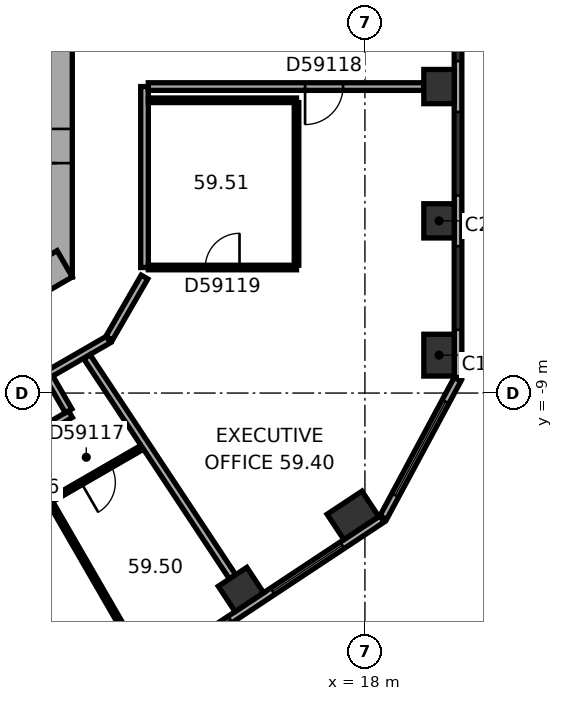
"""IFC4 building model, lengths in metres.
Left out: names, types, materials, properties, quantities, classifications, styles, units other than length and angle.
Written with IfcOpenShell. Run it as: python <this file> out.ifc"""

import sys

from ifc_helpers import new_model, si_unit, direction, frame, frame_2d, origin, origin_2d, place, context, subcontext, project, spatial, rectangle, extrude, element, fill, save


model = new_model("IFC4")
c1 = context("Model", 3, precision=1e-05, world=origin(), true_north=direction((0.0, 1.0)))
c2 = subcontext(c1, "Body", "Model", "MODEL_VIEW")
j1 = project(units=[si_unit("LENGTHUNIT", "METRE"), si_unit("PLANEANGLEUNIT", "RADIAN")], contexts=[c1])
p1 = place(None, origin())
s1 = spatial("IfcSite", under=j1, at=p1, CompositionType="ELEMENT")
p2 = place(p1, origin())
s2 = spatial("IfcBuilding", under=s1, at=p2, CompositionType="ELEMENT")
p3 = place(p2, frame((0.0, 0.0, 240.2)))
s3 = spatial("IfcBuildingStorey", under=s2, at=p3, CompositionType="ELEMENT", Elevation=240.2)
p4 = place(p3, frame((19.95, -8.003, 0.0), z_axis=(0.0, 0.0, 1.0), x_axis=(0.0, 1.0, 0.0)))
e1 = element("IfcColumn", 1, at=p4, inside=s3, PredefinedType="COLUMN", context=c2, shape_type="SweptSolid", body=[
    extrude(rectangle(XDim=1.1, YDim=0.8, at=origin_2d()), origin(), (0.0, 0.0, 1.0), 3.7),
])
for number, where, z_axis, x_axis in (
    (2, (19.95, -4.469, 0.0), (0.0, 0.0, 1.0), (0.0, 1.0, 0.0)),
    (3, (19.95, -0.936, 0.0), (0.0, 0.0, 1.0), (0.0, 1.0, 0.0)),
    (4, (14.738, -14.169, 0.0), (0.0, 0.0, 1.0), (0.834, 0.552, 0.0)),
):
    element("IfcColumn", number, at=place(p3, frame(where, z_axis=z_axis, x_axis=x_axis)), inside=s3, PredefinedType="COLUMN", context=c2, shape_type="SweptSolid", body=[
        extrude(rectangle(XDim=0.9, YDim=0.8, at=origin_2d()), origin(), (0.0, 0.0, 1.0), 3.7),
    ])
p5 = place(p3, frame((17.685, -12.219, 0.0), z_axis=(0.0, 0.0, 1.0), x_axis=(0.833885822067, 0.551936985312, 0.0)))
e5 = element("IfcColumn", 5, at=p5, inside=s3, PredefinedType="COLUMN", context=c2, shape_type="SweptSolid", body=[
    extrude(rectangle(XDim=1.1, YDim=0.8, at=origin_2d()), origin(), (0.0, 0.0, 1.0), 3.7),
])
p6 = place(p3, frame((9.9, -5.947, 0.0), z_axis=(0.0, 0.0, 1.0), x_axis=(0.0, 1.0, 0.0)))
e6 = element("IfcWall", 6, at=p6, inside=s3, PredefinedType="SHEAR", context=c2, shape_type="SweptSolid", body=[
    extrude(rectangle(XDim=11.894, YDim=0.8, at=frame_2d((5.947, 0.0))), origin(), (0.0, 0.0, 1.0), 3.7),
])
p7 = place(p6, frame((6.147, 0.0, 0.0)))
e7 = element("IfcOpeningElement", 7, at=p7, cuts=e6, PredefinedType="OPENING", context=c2, shape_type="SweptSolid", body=[
    extrude(rectangle(XDim=1.5, YDim=2.1, at=frame_2d((0.75, 1.05))), frame((0.0, 0.41, 0.0), z_axis=(0.0, -1.0, 0.0), x_axis=(1.0, 0.0, 0.0)), (0.0, 0.0, 1.0), 0.82),
])
p8 = place(p6, frame((2.997, 0.0, 0.0)))
e8 = element("IfcOpeningElement", 8, at=p8, cuts=e6, PredefinedType="OPENING", context=c2, shape_type="SweptSolid", body=[
    extrude(rectangle(XDim=0.9, YDim=2.1, at=frame_2d((0.45, 1.05))), frame((0.0, 0.41, 0.0), z_axis=(0.0, -1.0, 0.0), x_axis=(1.0, 0.0, 0.0)), (0.0, 0.0, 1.0), 0.82),
])
p9 = place(p3, frame((-0.2, -11.547, 0.0), z_axis=(0.0, 0.0, 1.0), x_axis=(0.866023897231, 0.500002609418, 0.0)))
e9 = element("IfcWall", 9, at=p9, inside=s3, PredefinedType="SHEAR", context=c2, shape_type="SweptSolid", body=[
    extrude(rectangle(XDim=11.894, YDim=0.8, at=frame_2d((5.947, 0.0))), origin(), (0.0, 0.0, 1.0), 3.7),
])
p10 = place(p9, frame((2.497, 0.0, 0.0)))
e10 = element("IfcOpeningElement", 10, at=p10, cuts=e9, PredefinedType="OPENING", context=c2, shape_type="SweptSolid", body=[
    extrude(rectangle(XDim=1.1, YDim=2.1, at=frame_2d((0.55, 1.05))), frame((0.0, 0.41, 0.0), z_axis=(0.0, -1.0, 0.0), x_axis=(1.0, 0.0, 0.0)), (0.0, 0.0, 1.0), 0.82),
])
p11 = place(p9, frame((5.097, 0.0, 0.0)))
e11 = element("IfcOpeningElement", 11, at=p11, cuts=e9, PredefinedType="OPENING", context=c2, shape_type="SweptSolid", body=[
    extrude(rectangle(XDim=1.1, YDim=2.1, at=frame_2d((0.55, 1.05))), frame((0.0, 0.41, 0.0), z_axis=(0.0, -1.0, 0.0), x_axis=(1.0, 0.0, 0.0)), (0.0, 0.0, 1.0), 0.82),
])
p12 = place(p9, frame((7.697, 0.0, 0.0)))
e12 = element("IfcOpeningElement", 12, at=p12, cuts=e9, PredefinedType="OPENING", context=c2, shape_type="SweptSolid", body=[
    extrude(rectangle(XDim=1.1, YDim=2.1, at=frame_2d((0.55, 1.05))), frame((0.0, 0.41, 0.0), z_axis=(0.0, -1.0, 0.0), x_axis=(1.0, 0.0, 0.0)), (0.0, 0.0, 1.0), 0.82),
])
p13 = place(p3, frame((20.45, -8.59, 0.0), z_axis=(0.0, 0.0, 1.0), x_axis=(0.0, 1.0, 0.0)))
e13 = element("IfcWall", 13, at=p13, inside=s3, PredefinedType="STANDARD", context=c2, shape_type="SweptSolid", body=[
    extrude(rectangle(XDim=18.841, YDim=0.2, at=frame_2d((9.421, 0.0))), origin(), (0.0, 0.0, 1.0), 3.7),
])
p14 = place(p13, frame((1.254, 0.0, 0.9)))
e14 = element("IfcOpeningElement", 14, at=p14, cuts=e13, PredefinedType="OPENING", context=c2, shape_type="SweptSolid", body=[
    extrude(rectangle(XDim=2.2, YDim=2.0, at=frame_2d((1.1, 1.0))), frame((0.0, 0.11, 0.0), z_axis=(0.0, -1.0, 0.0), x_axis=(1.0, 0.0, 0.0)), (0.0, 0.0, 1.0), 0.22),
])
p15 = place(p13, frame((4.788, 0.0, 0.9)))
e15 = element("IfcOpeningElement", 15, at=p15, cuts=e13, PredefinedType="OPENING", context=c2, shape_type="SweptSolid", body=[
    extrude(rectangle(XDim=2.2, YDim=2.0, at=frame_2d((1.1, 1.0))), frame((0.0, 0.11, 0.0), z_axis=(0.0, -1.0, 0.0), x_axis=(1.0, 0.0, 0.0)), (0.0, 0.0, 1.0), 0.22),
])
p16 = place(p13, frame((8.322, 0.0, 0.9)))
e16 = element("IfcOpeningElement", 16, at=p16, cuts=e13, PredefinedType="OPENING", context=c2, shape_type="SweptSolid", body=[
    extrude(rectangle(XDim=2.2, YDim=2.0, at=frame_2d((1.1, 1.0))), frame((0.0, 0.11, 0.0), z_axis=(0.0, -1.0, 0.0), x_axis=(1.0, 0.0, 0.0)), (0.0, 0.0, 1.0), 0.22),
])
p17 = place(p13, frame((11.855, 0.0, 0.9)))
e17 = element("IfcOpeningElement", 17, at=p17, cuts=e13, PredefinedType="OPENING", context=c2, shape_type="SweptSolid", body=[
    extrude(rectangle(XDim=2.2, YDim=2.0, at=frame_2d((1.1, 1.0))), frame((0.0, 0.11, 0.0), z_axis=(0.0, -1.0, 0.0), x_axis=(1.0, 0.0, 0.0)), (0.0, 0.0, 1.0), 0.22),
])
p18 = place(p13, frame((15.389, 0.0, 0.9)))
e18 = element("IfcOpeningElement", 18, at=p18, cuts=e13, PredefinedType="OPENING", context=c2, shape_type="SweptSolid", body=[
    extrude(rectangle(XDim=2.2, YDim=2.0, at=frame_2d((1.1, 1.0))), frame((0.0, 0.11, 0.0), z_axis=(0.0, -1.0, 0.0), x_axis=(1.0, 0.0, 0.0)), (0.0, 0.0, 1.0), 0.22),
])
p19 = place(p3, frame((2.739, -22.711, 0.0), z_axis=(0.0, 0.0, 1.0), x_axis=(0.833885723098, 0.551937134838, 0.0)))
e19 = element("IfcWall", 19, at=p19, inside=s3, PredefinedType="STANDARD", context=c2, shape_type="SweptSolid", body=[
    extrude(rectangle(XDim=18.841, YDim=0.2, at=frame_2d((9.421, 0.0))), origin(), (0.0, 0.0, 1.0), 3.7),
])
p20 = place(p19, frame((1.252, 0.0, 0.9)))
e20 = element("IfcOpeningElement", 20, at=p20, cuts=e19, PredefinedType="OPENING", context=c2, shape_type="SweptSolid", body=[
    extrude(rectangle(XDim=2.2, YDim=2.0, at=frame_2d((1.1, 1.0))), frame((0.0, 0.11, 0.0), z_axis=(0.0, -1.0, 0.0), x_axis=(1.0, 0.0, 0.0)), (0.0, 0.0, 1.0), 0.22),
])
p21 = place(p19, frame((4.786, 0.0, 0.9)))
e21 = element("IfcOpeningElement", 21, at=p21, cuts=e19, PredefinedType="OPENING", context=c2, shape_type="SweptSolid", body=[
    extrude(rectangle(XDim=2.2, YDim=2.0, at=frame_2d((1.1, 1.0))), frame((0.0, 0.11, 0.0), z_axis=(0.0, -1.0, 0.0), x_axis=(1.0, 0.0, 0.0)), (0.0, 0.0, 1.0), 0.22),
])
p22 = place(p19, frame((8.32, 0.0, 0.9)))
e22 = element("IfcOpeningElement", 22, at=p22, cuts=e19, PredefinedType="OPENING", context=c2, shape_type="SweptSolid", body=[
    extrude(rectangle(XDim=2.2, YDim=2.0, at=frame_2d((1.1, 1.0))), frame((0.0, 0.11, 0.0), z_axis=(0.0, -1.0, 0.0), x_axis=(1.0, 0.0, 0.0)), (0.0, 0.0, 1.0), 0.22),
])
p23 = place(p19, frame((11.854, 0.0, 0.9)))
e23 = element("IfcOpeningElement", 23, at=p23, cuts=e19, PredefinedType="OPENING", context=c2, shape_type="SweptSolid", body=[
    extrude(rectangle(XDim=2.2, YDim=2.0, at=frame_2d((1.1, 1.0))), frame((0.0, 0.11, 0.0), z_axis=(0.0, -1.0, 0.0), x_axis=(1.0, 0.0, 0.0)), (0.0, 0.0, 1.0), 0.22),
])
p24 = place(p19, frame((15.387, 0.0, 0.9)))
e24 = element("IfcOpeningElement", 24, at=p24, cuts=e19, PredefinedType="OPENING", context=c2, shape_type="SweptSolid", body=[
    extrude(rectangle(XDim=2.2, YDim=2.0, at=frame_2d((1.1, 1.0))), frame((0.0, 0.11, 0.0), z_axis=(0.0, -1.0, 0.0), x_axis=(1.0, 0.0, 0.0)), (0.0, 0.0, 1.0), 0.22),
])
p25 = place(p3, frame((18.483, -12.276, 0.0), z_axis=(0.0, 0.0, 1.0), x_axis=(0.473267675015, 0.880918672629, 0.0)))
e25 = element("IfcWall", 25, at=p25, inside=s3, PredefinedType="STANDARD", context=c2, shape_type="SweptSolid", body=[
    extrude(rectangle(XDim=4.13, YDim=0.2, at=frame_2d((2.065, 0.0))), origin(), (0.0, 0.0, 1.0), 3.7),
])
p26 = place(p25, frame((0.665, 0.0, 0.9)))
e26 = element("IfcOpeningElement", 26, at=p26, cuts=e25, PredefinedType="OPENING", context=c2, shape_type="SweptSolid", body=[
    extrude(rectangle(XDim=2.8, YDim=2.0, at=frame_2d((1.4, 1.0))), frame((0.0, 0.11, 0.0), z_axis=(0.0, -1.0, 0.0), x_axis=(1.0, 0.0, 0.0)), (0.0, 0.0, 1.0), 0.22),
])
p27 = place(p3, frame((2.716, -13.906, 0.0), z_axis=(0.0, 0.0, 1.0), x_axis=(0.866040290674, 0.499974214264, 0.0)))
e27 = element("IfcWall", 27, at=p27, inside=s3, PredefinedType="PARTITIONING", context=c2, shape_type="SweptSolid", body=[
    extrude(rectangle(XDim=8.702, YDim=0.2, at=frame_2d((4.351, 0.0))), origin(), (0.0, 0.0, 1.0), 3.42),
])
p28 = place(p27, frame((5.26, 0.0, 0.0)))
e28 = element("IfcOpeningElement", 28, at=p28, cuts=e27, PredefinedType="OPENING", context=c2, shape_type="SweptSolid", body=[
    extrude(rectangle(XDim=1.0, YDim=2.1, at=frame_2d((0.5, 1.05))), frame((0.0, 0.11, 0.0), z_axis=(0.0, -1.0, 0.0), x_axis=(1.0, 0.0, 0.0)), (0.0, 0.0, 1.0), 0.22),
])
p29 = place(p3, frame((6.183, -13.867, 0.0), z_axis=(0.0, 0.0, 1.0), x_axis=(0.866031365477, 0.499989673903, 0.0)))
e29 = element("IfcWall", 29, at=p29, inside=s3, PredefinedType="PARTITIONING", context=c2, shape_type="SweptSolid", body=[
    extrude(rectangle(XDim=6.881, YDim=0.12, at=frame_2d((3.44, 0.0))), origin(), (0.0, 0.0, 1.0), 3.42),
])
p30 = place(p29, frame((0.5, 0.0, 0.0)))
e30 = element("IfcOpeningElement", 30, at=p30, cuts=e29, PredefinedType="OPENING", context=c2, shape_type="SweptSolid", body=[
    extrude(rectangle(XDim=1.0, YDim=2.1, at=frame_2d((0.5, 1.05))), frame((0.0, 0.07, 0.0), z_axis=(0.0, -1.0, 0.0), x_axis=(1.0, 0.0, 0.0)), (0.0, 0.0, 1.0), 0.14),
])
p31 = place(p29, frame((2.583, 0.0, 0.0)))
e31 = element("IfcOpeningElement", 31, at=p31, cuts=e29, PredefinedType="OPENING", context=c2, shape_type="SweptSolid", body=[
    extrude(rectangle(XDim=0.9, YDim=2.1, at=frame_2d((0.45, 1.05))), frame((0.0, 0.07, 0.0), z_axis=(0.0, -1.0, 0.0), x_axis=(1.0, 0.0, 0.0)), (0.0, 0.0, 1.0), 0.14),
])
p32 = place(p29, frame((5.023, 0.0, 0.0)))
e32 = element("IfcOpeningElement", 32, at=p32, cuts=e29, PredefinedType="OPENING", context=c2, shape_type="SweptSolid", body=[
    extrude(rectangle(XDim=0.9, YDim=2.1, at=frame_2d((0.45, 1.05))), frame((0.0, 0.07, 0.0), z_axis=(0.0, -1.0, 0.0), x_axis=(1.0, 0.0, 0.0)), (0.0, 0.0, 1.0), 0.14),
])
p33 = place(p3, frame((9.652, -8.515, 0.0), z_axis=(0.0, 0.0, 1.0), x_axis=(0.866020375458, 0.500008709215, 0.0)))
e33 = element("IfcWall", 33, at=p33, inside=s3, PredefinedType="PARTITIONING", context=c2, shape_type="SweptSolid", body=[
    extrude(rectangle(XDim=1.846, YDim=0.2, at=frame_2d((0.923, 0.0))), origin(), (0.0, 0.0, 1.0), 3.42),
])
p34 = place(p3, frame((10.202, -9.469, 0.0), z_axis=(0.0, 0.0, 1.0), x_axis=(-0.499968756647, 0.866043441391, 0.0)))
e34 = element("IfcWall", 34, at=p34, inside=s3, PredefinedType="PARTITIONING", context=c2, shape_type="SweptSolid", body=[
    extrude(rectangle(XDim=1.001, YDim=0.2, at=frame_2d((0.5, 0.0))), origin(), (0.0, 0.0, 1.0), 3.42),
])
p35 = place(p3, frame((11.27, -7.558, 0.0), z_axis=(0.0, 0.0, 1.0), x_axis=(0.499964847546, 0.866045698112, 0.0)))
e35 = element("IfcWall", 35, at=p35, inside=s3, PredefinedType="PARTITIONING", context=c2, shape_type="SweptSolid", body=[
    extrude(rectangle(XDim=1.86, YDim=0.2, at=frame_2d((0.93, 0.0))), origin(), (0.0, 0.0, 1.0), 3.42),
])
p36 = place(p3, frame((11.87, -15.588, 0.0), z_axis=(0.0, 0.0, 1.0), x_axis=(-0.49999774064, 0.866026708223, 0.0)))
e36 = element("IfcWall", 36, at=p36, inside=s3, PredefinedType="PARTITIONING", context=c2, shape_type="SweptSolid", body=[
    extrude(rectangle(XDim=4.273, YDim=0.12, at=frame_2d((2.137, 0.0))), origin(), (0.0, 0.0, 1.0), 3.42),
])
p37 = place(p3, frame((12.2, -5.697, 0.0), z_axis=(0.0, 0.0, 1.0), x_axis=(0.0, 1.0, 0.0)))
e37 = element("IfcWall", 37, at=p37, inside=s3, PredefinedType="PARTITIONING", context=c2, shape_type="SweptSolid", body=[
    extrude(rectangle(XDim=4.761, YDim=0.2, at=frame_2d((2.381, 0.0))), origin(), (0.0, 0.0, 1.0), 3.42),
])
p38 = place(p3, frame((12.3, -1.297, 0.0), z_axis=(0.0, 0.0, 1.0), x_axis=(1.0, 0.0, 0.0)))
e38 = element("IfcWall", 38, at=p38, inside=s3, PredefinedType="PARTITIONING", context=c2, shape_type="SweptSolid", body=[
    extrude(rectangle(XDim=3.9, YDim=0.12, at=frame_2d((1.95, 0.0))), origin(), (0.0, 0.0, 1.0), 3.42),
])
p39 = place(p3, frame((12.3, -0.936, 0.0), z_axis=(0.0, 0.0, 1.0), x_axis=(1.0, 0.0, 0.0)))
e39 = element("IfcWall", 39, at=p39, inside=s3, PredefinedType="PARTITIONING", context=c2, shape_type="SweptSolid", body=[
    extrude(rectangle(XDim=7.25, YDim=0.2, at=frame_2d((3.625, 0.0))), origin(), (0.0, 0.0, 1.0), 2.87),
])
p40 = place(p39, frame((4.125, 0.0, 0.0)))
e40 = element("IfcOpeningElement", 40, at=p40, cuts=e39, PredefinedType="OPENING", context=c2, shape_type="SweptSolid", body=[
    extrude(rectangle(XDim=1.0, YDim=2.1, at=frame_2d((0.5, 1.05))), frame((0.0, 0.11, 0.0), z_axis=(0.0, -1.0, 0.0), x_axis=(1.0, 0.0, 0.0)), (0.0, 0.0, 1.0), 0.22),
])
p41 = place(p3, frame((14.517, -13.836, 0.0), z_axis=(0.0, 0.0, 1.0), x_axis=(-0.551938455794, 0.833884848775, 0.0)))
e41 = element("IfcWall", 41, at=p41, inside=s3, PredefinedType="PARTITIONING", context=c2, shape_type="SweptSolid", body=[
    extrude(rectangle(XDim=6.944, YDim=0.2, at=frame_2d((3.472, 0.0))), origin(), (0.0, 0.0, 1.0), 2.87),
])
p42 = place(p3, frame((16.2, -5.697, 0.0), z_axis=(0.0, 0.0, 1.0), x_axis=(-1.0, 0.0, 0.0)))
e42 = element("IfcWall", 42, at=p42, inside=s3, PredefinedType="PARTITIONING", context=c2, shape_type="SweptSolid", body=[
    extrude(rectangle(XDim=3.9, YDim=0.12, at=frame_2d((1.95, 0.0))), origin(), (0.0, 0.0, 1.0), 3.42),
])
p43 = place(p42, frame((1.5, 0.0, 0.0)))
e43 = element("IfcOpeningElement", 43, at=p43, cuts=e42, PredefinedType="OPENING", context=c2, shape_type="SweptSolid", body=[
    extrude(rectangle(XDim=0.9, YDim=2.1, at=frame_2d((0.45, 1.05))), frame((0.0, 0.07, 0.0), z_axis=(0.0, -1.0, 0.0), x_axis=(1.0, 0.0, 0.0)), (0.0, 0.0, 1.0), 0.14),
])
p44 = place(p3, frame((16.2, -1.357, 0.0), z_axis=(0.0, 0.0, 1.0), x_axis=(0.0, -1.0, 0.0)))
e44 = element("IfcWall", 44, at=p44, inside=s3, PredefinedType="PARTITIONING", context=c2, shape_type="SweptSolid", body=[
    extrude(rectangle(XDim=4.28, YDim=0.12, at=frame_2d((2.14, 0.0))), origin(), (0.0, 0.0, 1.0), 3.42),
])
p45 = place(p14, origin())
e45 = element("IfcWindow", 45, at=p45, inside=s3, PartitioningType="SINGLE_PANEL", PredefinedType="WINDOW", context=c2, shape_type="SweptSolid", body=[
    extrude(rectangle(XDim=2.2, YDim=2.0, at=frame_2d((1.1, 1.0))), frame((0.0, 0.03, 0.0), z_axis=(0.0, -1.0, 0.0), x_axis=(1.0, 0.0, 0.0)), (0.0, 0.0, 1.0), 0.06),
])
fill(e14, e45)
p46 = place(p15, origin())
e46 = element("IfcWindow", 46, at=p46, inside=s3, PartitioningType="SINGLE_PANEL", PredefinedType="WINDOW", context=c2, shape_type="SweptSolid", body=[
    extrude(rectangle(XDim=2.2, YDim=2.0, at=frame_2d((1.1, 1.0))), frame((0.0, 0.03, 0.0), z_axis=(0.0, -1.0, 0.0), x_axis=(1.0, 0.0, 0.0)), (0.0, 0.0, 1.0), 0.06),
])
fill(e15, e46)
p47 = place(p16, origin())
e47 = element("IfcWindow", 47, at=p47, inside=s3, PartitioningType="SINGLE_PANEL", PredefinedType="WINDOW", context=c2, shape_type="SweptSolid", body=[
    extrude(rectangle(XDim=2.2, YDim=2.0, at=frame_2d((1.1, 1.0))), frame((0.0, 0.03, 0.0), z_axis=(0.0, -1.0, 0.0), x_axis=(1.0, 0.0, 0.0)), (0.0, 0.0, 1.0), 0.06),
])
fill(e16, e47)
p48 = place(p23, origin())
e48 = element("IfcWindow", 48, at=p48, inside=s3, PartitioningType="SINGLE_PANEL", PredefinedType="WINDOW", context=c2, shape_type="SweptSolid", body=[
    extrude(rectangle(XDim=2.2, YDim=2.0, at=frame_2d((1.1, 1.0))), frame((0.0, 0.03, 0.0), z_axis=(0.0, -1.0, 0.0), x_axis=(1.0, 0.0, 0.0)), (0.0, 0.0, 1.0), 0.06),
])
fill(e23, e48)
p49 = place(p24, origin())
e49 = element("IfcWindow", 49, at=p49, inside=s3, PartitioningType="SINGLE_PANEL", PredefinedType="WINDOW", context=c2, shape_type="SweptSolid", body=[
    extrude(rectangle(XDim=2.2, YDim=2.0, at=frame_2d((1.1, 1.0))), frame((0.0, 0.03, 0.0), z_axis=(0.0, -1.0, 0.0), x_axis=(1.0, 0.0, 0.0)), (0.0, 0.0, 1.0), 0.06),
])
fill(e24, e49)
p50 = place(p26, origin())
e50 = element("IfcWindow", 50, at=p50, inside=s3, PartitioningType="SINGLE_PANEL", PredefinedType="WINDOW", context=c2, shape_type="SweptSolid", body=[
    extrude(rectangle(XDim=2.8, YDim=2.0, at=frame_2d((1.4, 1.0))), frame((0.0, 0.03, 0.0), z_axis=(0.0, -1.0, 0.0), x_axis=(1.0, 0.0, 0.0)), (0.0, 0.0, 1.0), 0.06),
])
fill(e26, e50)
p51 = place(p8, origin())
e51 = element("IfcDoor", 51, at=p51, inside=s3, OperationType="SINGLE_SWING_LEFT", PredefinedType="DOOR", context=c2, shape_type="SweptSolid", body=[
    extrude(rectangle(XDim=0.9, YDim=2.1, at=frame_2d((0.45, 1.05))), frame((0.0, 0.025, 0.0), z_axis=(0.0, -1.0, 0.0), x_axis=(1.0, 0.0, 0.0)), (0.0, 0.0, 1.0), 0.05),
])
fill(e8, e51)
p52 = place(p32, origin())
e52 = element("IfcDoor", 52, at=p52, inside=s3, OperationType="SINGLE_SWING_LEFT", PredefinedType="DOOR", context=c2, shape_type="SweptSolid", body=[
    extrude(rectangle(XDim=0.9, YDim=2.1, at=frame_2d((0.45, 1.05))), frame((0.0, 0.025, 0.0), z_axis=(0.0, -1.0, 0.0), x_axis=(1.0, 0.0, 0.0)), (0.0, 0.0, 1.0), 0.05),
])
fill(e32, e52)
p53 = place(p40, origin())
e53 = element("IfcDoor", 53, at=p53, inside=s3, OperationType="SINGLE_SWING_LEFT", PredefinedType="DOOR", context=c2, shape_type="SweptSolid", body=[
    extrude(rectangle(XDim=1.0, YDim=2.1, at=frame_2d((0.5, 1.05))), frame((0.0, 0.025, 0.0), z_axis=(0.0, -1.0, 0.0), x_axis=(1.0, 0.0, 0.0)), (0.0, 0.0, 1.0), 0.05),
])
fill(e40, e53)
p54 = place(p43, origin())
e54 = element("IfcDoor", 54, at=p54, inside=s3, OperationType="SINGLE_SWING_LEFT", PredefinedType="DOOR", context=c2, shape_type="SweptSolid", body=[
    extrude(rectangle(XDim=0.9, YDim=2.1, at=frame_2d((0.45, 1.05))), frame((0.0, 0.025, 0.0), z_axis=(0.0, -1.0, 0.0), x_axis=(1.0, 0.0, 0.0)), (0.0, 0.0, 1.0), 0.05),
])
fill(e43, e54)
save(model, sys.argv[1])
